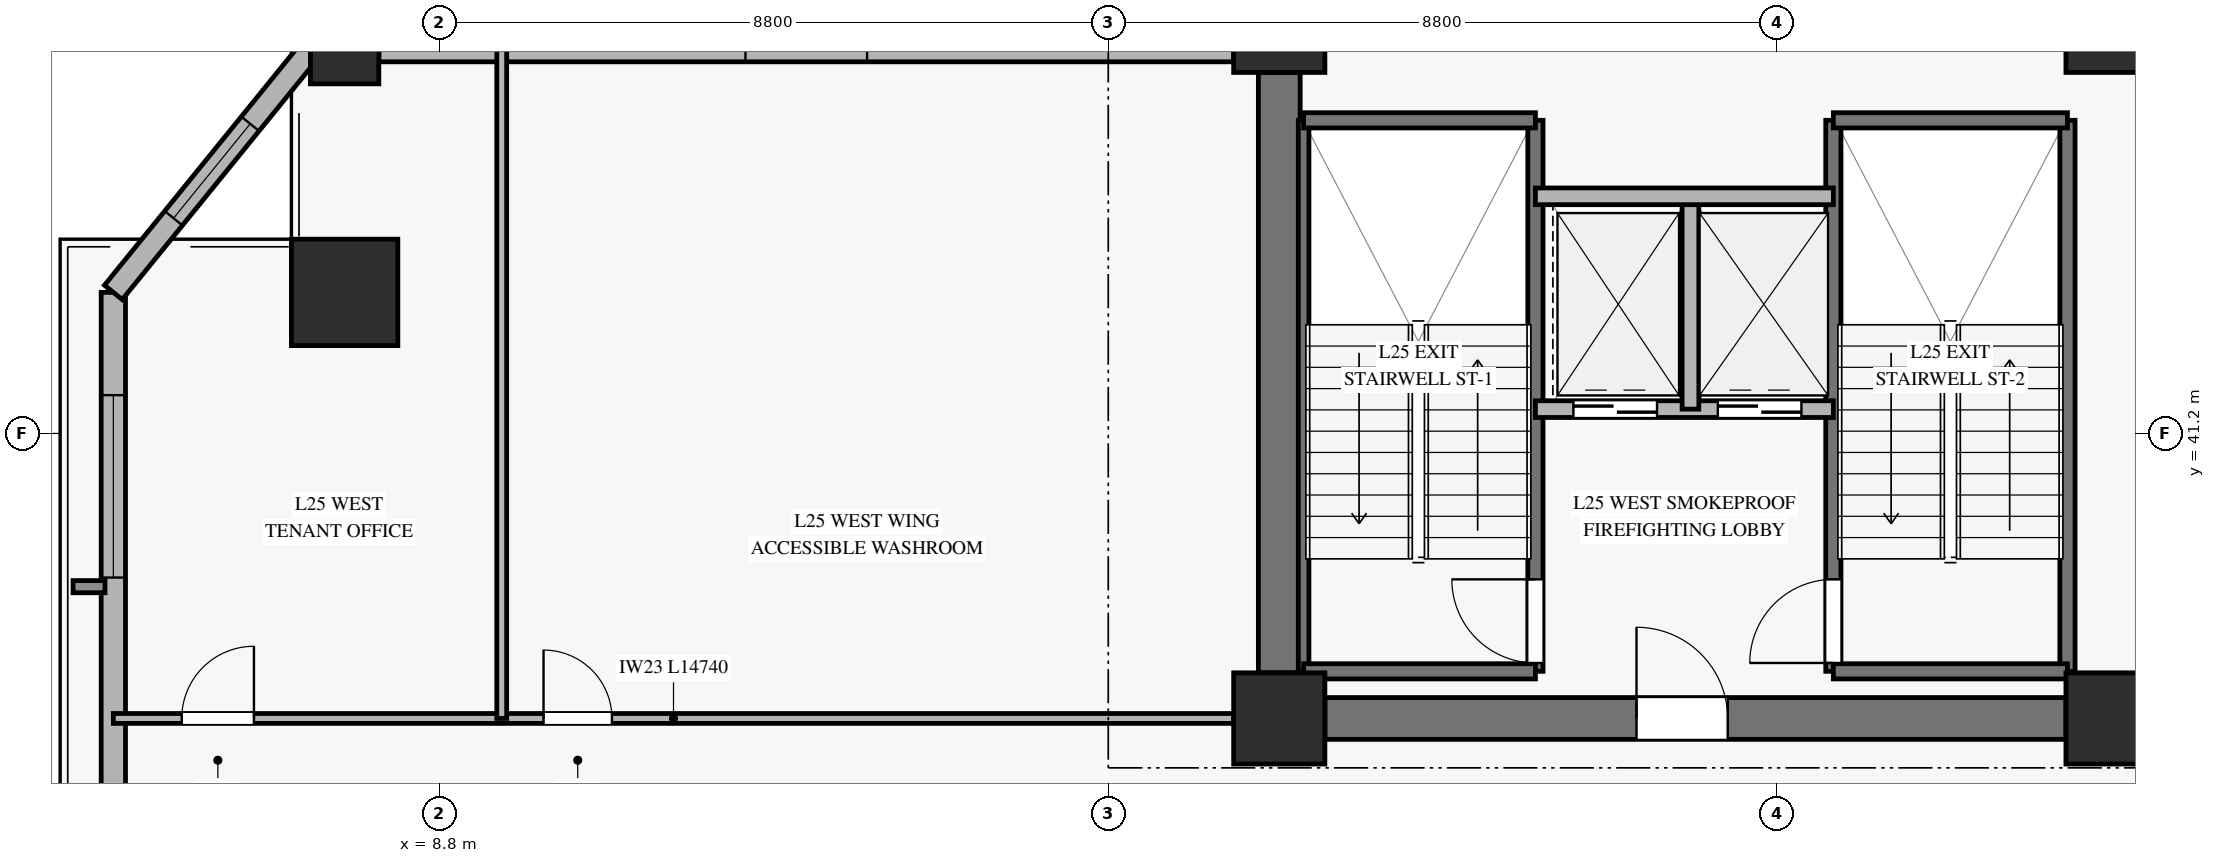
"""IFC4 building model, lengths in metres.
Left out: names, types, materials, properties, quantities, classifications, styles, units other than length and angle.
Written with IfcOpenShell. Run it as: python <this file> out.ifc"""

import sys

from ifc_helpers import new_model, si_unit, direction, frame, frame_2d, origin, origin_2d, place, context, subcontext, project, spatial, rectangle, hollow_rectangle, extrude, source, transform, mapped, element, fill, save


model = new_model("IFC4")
c1 = context("Model", 3, precision=1e-05, world=origin(), true_north=direction((0.0, 1.0)))
c2 = subcontext(c1, "Body", "Model", "MODEL_VIEW")
j1 = project(units=[si_unit("LENGTHUNIT", "METRE"), si_unit("PLANEANGLEUNIT", "RADIAN")], contexts=[c1])
p1 = place(None, origin())
s1 = spatial("IfcSite", under=j1, at=p1, CompositionType="ELEMENT")
p2 = place(p1, origin())
s2 = spatial("IfcBuilding", under=s1, at=p2, CompositionType="ELEMENT")
p3 = place(p2, frame((0.0, 0.0, 103.6)))
s3 = spatial("IfcBuildingStorey", under=s2, at=p3, CompositionType="ELEMENT", Elevation=103.6)
m1 = source(origin(), c2, "Body", "SweptSolid", [
    extrude(rectangle(XDim=1.2, YDim=1.2, at=origin_2d()), origin(), (0.0, 0.0, 1.0), 3.68),
])
for number, where, z_axis, x_axis in (
    (1, (19.85, 37.45, 0.0), (0.0, 0.0, 1.0), (1.0, 0.0, 0.0)),
    (2, (19.85, 46.55, 0.0), (0.0, 0.0, 1.0), (1.0, 0.0, 0.0)),
    (3, (30.8, 37.45, 0.0), (0.0, 0.0, 1.0), (1.0, 0.0, 0.0)),
    (4, (30.8, 46.55, 0.0), (0.0, 0.0, 1.0), (1.0, 0.0, 0.0)),
):
    element("IfcColumn", number, at=place(p3, frame(where, z_axis=z_axis, x_axis=x_axis)), inside=s3, PredefinedType="PILASTER", context=c2, shape_type="MappedRepresentation", body=[
        mapped(m1, transform((0.0, 0.0, 0.0), x_axis=(1.0, 0.0, 0.0), y_axis=(0.0, 1.0, 0.0), z_axis=(0.0, 0.0, 1.0), scale=1.0)),
    ])
p4 = place(p3, frame((20.45, 37.45, 0.0), z_axis=(0.0, 0.0, 1.0), x_axis=(1.0, 0.0, 0.0)))
e5 = element("IfcWall", 5, at=p4, inside=s3, PredefinedType="SHEAR", context=c2, shape_type="SweptSolid", body=[
    extrude(rectangle(XDim=9.75, YDim=0.55, at=frame_2d((4.875, 0.0))), origin(), (0.0, 0.0, 1.0), 3.68),
])
p5 = place(p4, frame((4.1, 0.0, 0.0)))
e6 = element("IfcOpeningElement", 6, at=p5, cuts=e5, PredefinedType="OPENING", context=c2, shape_type="SweptSolid", body=[
    extrude(rectangle(XDim=1.2, YDim=2.15, at=frame_2d((0.6, 1.075))), frame((0.0, 0.285, 0.0), z_axis=(0.0, -1.0, 0.0), x_axis=(1.0, 0.0, 0.0)), (0.0, 0.0, 1.0), 0.57),
])
p6 = place(p3, frame((19.85, 38.05, 0.0), z_axis=(0.0, 0.0, 1.0), x_axis=(0.0, 1.0, 0.0)))
e7 = element("IfcWall", 7, at=p6, inside=s3, PredefinedType="SHEAR", context=c2, shape_type="SweptSolid", body=[
    extrude(rectangle(XDim=7.9, YDim=0.55, at=frame_2d((3.95, 0.0))), origin(), (0.0, 0.0, 1.0), 3.68),
])
m2 = source(origin(), c2, "Body", "SweptSolid", [
    extrude(hollow_rectangle(XDim=1.4, YDim=1.4, WallThickness=0.065, at=origin_2d()), origin(), (0.0, 0.0, 1.0), 3.68),
])
p7 = place(p3, frame((7.553, 43.056, 0.0), z_axis=(0.0, 0.0, 1.0), x_axis=(1.0, 0.0, 0.0)))
e8 = element("IfcColumn", 8, at=p7, inside=s3, PredefinedType="COLUMN", context=c2, shape_type="MappedRepresentation", body=[
    mapped(m2, transform((0.0, 0.0, 0.0), x_axis=(1.0, 0.0, 0.0), y_axis=(0.0, 1.0, 0.0), z_axis=(0.0, 0.0, 1.0), scale=1.0)),
])
m3 = source(origin(), c2, "Body", "SweptSolid", [
    extrude(hollow_rectangle(XDim=0.9, YDim=0.9, WallThickness=0.04, at=origin_2d()), origin(), (0.0, 0.0, 1.0), 3.68),
])
p8 = place(p3, frame((7.553, 46.25, 0.0), z_axis=(0.0, 0.0, 1.0), x_axis=(1.0, 0.0, 0.0)))
e9 = element("IfcColumn", 9, at=p8, inside=s3, PredefinedType="COLUMN", context=c2, shape_type="MappedRepresentation", body=[
    mapped(m3, transform((0.0, 0.0, 0.0), x_axis=(1.0, 0.0, 0.0), y_axis=(0.0, 1.0, 0.0), z_axis=(0.0, 0.0, 1.0), scale=1.0)),
])
p9 = place(p3, frame((4.51, 26.73, 0.0), z_axis=(0.0, 0.0, 1.0), x_axis=(0.0, 1.0, 0.0)))
e10 = element("IfcWall", 10, at=p9, inside=s3, PredefinedType="SOLIDWALL", context=c2, shape_type="SweptSolid", body=[
    extrude(rectangle(XDim=16.326, YDim=0.32, at=frame_2d((8.163, 0.0))), origin(), (0.0, 0.0, 1.0), 3.16),
])
p10 = place(p9, frame((1.26, 0.0, 0.45)))
e11 = element("IfcOpeningElement", 11, at=p10, cuts=e10, PredefinedType="OPENING", context=c2, shape_type="SweptSolid", body=[
    extrude(rectangle(XDim=2.4, YDim=2.1, at=frame_2d((1.2, 1.05))), frame((0.0, 0.17, 0.0), z_axis=(0.0, -1.0, 0.0), x_axis=(1.0, 0.0, 0.0)), (0.0, 0.0, 1.0), 0.34),
])
p11 = place(p9, frame((12.574, 0.0, 0.45)))
e12 = element("IfcOpeningElement", 12, at=p11, cuts=e10, PredefinedType="OPENING", context=c2, shape_type="SweptSolid", body=[
    extrude(rectangle(XDim=2.4, YDim=2.1, at=frame_2d((1.2, 1.05))), frame((0.0, 0.17, 0.0), z_axis=(0.0, -1.0, 0.0), x_axis=(1.0, 0.0, 0.0)), (0.0, 0.0, 1.0), 0.34),
])
p12 = place(p3, frame((8.003, 46.25, 0.0), z_axis=(0.0, 0.0, 1.0), x_axis=(1.0, 0.0, 0.0)))
e13 = element("IfcWall", 13, at=p12, inside=s3, PredefinedType="SOLIDWALL", context=c2, shape_type="SweptSolid", body=[
    extrude(rectangle(XDim=11.247, YDim=0.32, at=frame_2d((5.624, 0.0))), origin(), (0.0, 0.0, 1.0), 3.16),
])
p13 = place(p12, frame((4.824, 0.0, 0.45)))
e14 = element("IfcOpeningElement", 14, at=p13, cuts=e13, PredefinedType="OPENING", context=c2, shape_type="SweptSolid", body=[
    extrude(rectangle(XDim=1.6, YDim=2.0, at=frame_2d((0.8, 1.0))), frame((0.0, 0.17, 0.0), z_axis=(0.0, -1.0, 0.0), x_axis=(1.0, 0.0, 0.0)), (0.0, 0.0, 1.0), 0.34),
])
p14 = place(p3, frame((7.103, 46.25, 0.0), z_axis=(0.0, 0.0, 1.0), x_axis=(-0.630273101398, -0.776373503962, 0.0)))
e15 = element("IfcWall", 15, at=p14, inside=s3, PredefinedType="SOLIDWALL", context=c2, shape_type="SweptSolid", body=[
    extrude(rectangle(XDim=4.114, YDim=0.3, at=frame_2d((2.057, 0.0))), origin(), (0.0, 0.0, 1.0), 3.16),
])
p15 = place(p14, frame((1.257, 0.0, 0.45)))
e16 = element("IfcOpeningElement", 16, at=p15, cuts=e15, PredefinedType="OPENING", context=c2, shape_type="SweptSolid", body=[
    extrude(rectangle(XDim=1.6, YDim=2.0, at=frame_2d((0.8, 1.0))), frame((0.0, 0.16, 0.0), z_axis=(0.0, -1.0, 0.0), x_axis=(1.0, 0.0, 0.0)), (0.0, 0.0, 1.0), 0.32),
])
p16 = place(p3, frame((20.17, 38.07, 0.0), z_axis=(0.0, 0.0, 1.0), x_axis=(0.0, 1.0, 0.0)))
e17 = element("IfcWall", 17, at=p16, inside=s3, PredefinedType="SOLIDWALL", context=c2, shape_type="SweptSolid", body=[
    extrude(rectangle(XDim=7.25, YDim=0.14, at=frame_2d((3.625, 0.0))), origin(), (0.0, 0.0, 1.0), 3.9),
])
p17 = place(p3, frame((23.22, 38.07, 0.0), z_axis=(0.0, 0.0, 1.0), x_axis=(0.0, 1.0, 0.0)))
e18 = element("IfcWall", 18, at=p17, inside=s3, PredefinedType="SOLIDWALL", context=c2, shape_type="SweptSolid", body=[
    extrude(rectangle(XDim=7.25, YDim=0.2, at=frame_2d((3.625, 0.0))), origin(), (0.0, 0.0, 1.0), 3.9),
])
p18 = place(p17, frame((0.11, 0.0, 0.0)))
e19 = element("IfcOpeningElement", 19, at=p18, cuts=e18, PredefinedType="OPENING", context=c2, shape_type="SweptSolid", body=[
    extrude(rectangle(XDim=1.1, YDim=2.15, at=frame_2d((0.55, 1.075))), frame((0.0, 0.11, 0.0), z_axis=(0.0, -1.0, 0.0), x_axis=(1.0, 0.0, 0.0)), (0.0, 0.0, 1.0), 0.22),
])
for number, where, z_axis, x_axis in (
    (20, (20.17, 45.32, 0.0), (0.0, 0.0, 1.0), (1.0, 0.0, 0.0)),
    (21, (20.17, 38.07, 0.0), (0.0, 0.0, 1.0), (1.0, 0.0, 0.0)),
):
    element("IfcWall", number, at=place(p3, frame(where, z_axis=z_axis, x_axis=x_axis)), inside=s3, PredefinedType="SOLIDWALL", context=c2, shape_type="SweptSolid", body=[
        extrude(rectangle(XDim=3.05, YDim=0.2, at=frame_2d((1.525, 0.0))), origin(), (0.0, 0.0, 1.0), 3.9),
    ])
p19 = place(p3, frame((27.14, 38.07, 0.0), z_axis=(0.0, 0.0, 1.0), x_axis=(0.0, 1.0, 0.0)))
e22 = element("IfcWall", 22, at=p19, inside=s3, PredefinedType="SOLIDWALL", context=c2, shape_type="SweptSolid", body=[
    extrude(rectangle(XDim=7.25, YDim=0.2, at=frame_2d((3.625, 0.0))), origin(), (0.0, 0.0, 1.0), 3.9),
])
p20 = place(p19, frame((0.11, 0.0, 0.0)))
e23 = element("IfcOpeningElement", 23, at=p20, cuts=e22, PredefinedType="OPENING", context=c2, shape_type="SweptSolid", body=[
    extrude(rectangle(XDim=1.1, YDim=2.15, at=frame_2d((0.55, 1.075))), frame((0.0, 0.11, 0.0), z_axis=(0.0, -1.0, 0.0), x_axis=(1.0, 0.0, 0.0)), (0.0, 0.0, 1.0), 0.22),
])
p21 = place(p3, frame((30.22, 38.07, 0.0), z_axis=(0.0, 0.0, 1.0), x_axis=(0.0, 1.0, 0.0)))
e24 = element("IfcWall", 24, at=p21, inside=s3, PredefinedType="SOLIDWALL", context=c2, shape_type="SweptSolid", body=[
    extrude(rectangle(XDim=7.25, YDim=0.2, at=frame_2d((3.625, 0.0))), origin(), (0.0, 0.0, 1.0), 3.9),
])
for number, where, z_axis, x_axis in (
    (25, (27.14, 45.32, 0.0), (0.0, 0.0, 1.0), (1.0, 0.0, 0.0)),
    (26, (27.14, 38.07, 0.0), (0.0, 0.0, 1.0), (1.0, 0.0, 0.0)),
):
    element("IfcWall", number, at=place(p3, frame(where, z_axis=z_axis, x_axis=x_axis)), inside=s3, PredefinedType="SOLIDWALL", context=c2, shape_type="SweptSolid", body=[
        extrude(rectangle(XDim=3.08, YDim=0.2, at=frame_2d((1.54, 0.0))), origin(), (0.0, 0.0, 1.0), 3.9),
    ])
p22 = place(p3, frame((23.22, 41.52, 0.0), z_axis=(0.0, 0.0, 1.0), x_axis=(1.0, 0.0, 0.0)))
e27 = element("IfcWall", 27, at=p22, inside=s3, PredefinedType="SOLIDWALL", context=c2, shape_type="SweptSolid", body=[
    extrude(rectangle(XDim=3.92, YDim=0.22, at=frame_2d((1.96, 0.0))), origin(), (0.0, 0.0, 1.0), 3.68),
])
p23 = place(p22, frame((0.5, 0.0, 0.0)))
e28 = element("IfcOpeningElement", 28, at=p23, cuts=e27, PredefinedType="OPENING", context=c2, shape_type="SweptSolid", body=[
    extrude(rectangle(XDim=1.1, YDim=2.2, at=frame_2d((0.55, 1.1))), frame((0.0, 0.12, 0.0), z_axis=(0.0, -1.0, 0.0), x_axis=(1.0, 0.0, 0.0)), (0.0, 0.0, 1.0), 0.24),
])
p24 = place(p22, frame((2.4, 0.0, 0.0)))
e29 = element("IfcOpeningElement", 29, at=p24, cuts=e27, PredefinedType="OPENING", context=c2, shape_type="SweptSolid", body=[
    extrude(rectangle(XDim=1.1, YDim=2.2, at=frame_2d((0.55, 1.1))), frame((0.0, 0.12, 0.0), z_axis=(0.0, -1.0, 0.0), x_axis=(1.0, 0.0, 0.0)), (0.0, 0.0, 1.0), 0.24),
])
p25 = place(p3, frame((25.26, 41.52, 0.0), z_axis=(0.0, 0.0, 1.0), x_axis=(0.0, 1.0, 0.0)))
e30 = element("IfcWall", 30, at=p25, inside=s3, PredefinedType="SOLIDWALL", context=c2, shape_type="SweptSolid", body=[
    extrude(rectangle(XDim=2.8, YDim=0.22, at=frame_2d((1.4, 0.0))), origin(), (0.0, 0.0, 1.0), 3.68),
])
p26 = place(p3, frame((23.22, 44.32, 0.0), z_axis=(0.0, 0.0, 1.0), x_axis=(1.0, 0.0, 0.0)))
e31 = element("IfcWall", 31, at=p26, inside=s3, PredefinedType="SOLIDWALL", context=c2, shape_type="SweptSolid", body=[
    extrude(rectangle(XDim=3.92, YDim=0.22, at=frame_2d((1.96, 0.0))), origin(), (0.0, 0.0, 1.0), 3.68),
])
p27 = place(p3, frame((4.51, 37.45, 0.0), z_axis=(0.0, 0.0, 1.0), x_axis=(1.0, 0.0, 0.0)))
e32 = element("IfcWall", 32, at=p27, inside=s3, PredefinedType="PARTITIONING", context=c2, shape_type="SweptSolid", body=[
    extrude(rectangle(XDim=14.74, YDim=0.13, at=frame_2d((7.37, 0.0))), origin(), (0.0, 0.0, 1.0), 3.165),
])
p28 = place(p27, frame((0.9, 0.0, 0.0)))
e33 = element("IfcOpeningElement", 33, at=p28, cuts=e32, PredefinedType="OPENING", context=c2, shape_type="SweptSolid", body=[
    extrude(rectangle(XDim=0.95, YDim=2.1, at=frame_2d((0.475, 1.05))), frame((0.0, 0.075, 0.0), z_axis=(0.0, -1.0, 0.0), x_axis=(1.0, 0.0, 0.0)), (0.0, 0.0, 1.0), 0.15),
])
p29 = place(p27, frame((5.66, 0.0, 0.0)))
e34 = element("IfcOpeningElement", 34, at=p29, cuts=e32, PredefinedType="OPENING", context=c2, shape_type="SweptSolid", body=[
    extrude(rectangle(XDim=0.9, YDim=2.1, at=frame_2d((0.45, 1.05))), frame((0.0, 0.075, 0.0), z_axis=(0.0, -1.0, 0.0), x_axis=(1.0, 0.0, 0.0)), (0.0, 0.0, 1.0), 0.15),
])
p30 = place(p3, frame((9.62, 37.45, 0.0), z_axis=(0.0, 0.0, 1.0), x_axis=(0.0, 1.0, 0.0)))
e35 = element("IfcWall", 35, at=p30, inside=s3, PredefinedType="PARTITIONING", context=c2, shape_type="SweptSolid", body=[
    extrude(rectangle(XDim=8.8, YDim=0.13, at=frame_2d((4.4, 0.0))), origin(), (0.0, 0.0, 1.0), 3.68),
])
m4 = source(origin(), c2, "Body", "SweptSolid", [
    extrude(rectangle(XDim=2.4, YDim=2.1, at=frame_2d((1.2, 1.05))), frame((0.0, 0.03, 0.0), z_axis=(0.0, -1.0, 0.0), x_axis=(1.0, 0.0, 0.0)), (0.0, 0.0, 1.0), 0.06),
])
p31 = place(p11, origin())
e36 = element("IfcWindow", 36, at=p31, inside=s3, PartitioningType="SINGLE_PANEL", PredefinedType="WINDOW", context=c2, shape_type="MappedRepresentation", body=[
    mapped(m4, transform((0.0, 0.0, 0.0), x_axis=(1.0, 0.0, 0.0), y_axis=(0.0, 1.0, 0.0), z_axis=(0.0, 0.0, 1.0), scale=1.0)),
])
fill(e12, e36)
m5 = source(origin(), c2, "Body", "SweptSolid", [
    extrude(rectangle(XDim=1.6, YDim=2.0, at=frame_2d((0.8, 1.0))), frame((0.0, 0.03, 0.0), z_axis=(0.0, -1.0, 0.0), x_axis=(1.0, 0.0, 0.0)), (0.0, 0.0, 1.0), 0.06),
])
p32 = place(p15, origin())
e37 = element("IfcWindow", 37, at=p32, inside=s3, PartitioningType="SINGLE_PANEL", PredefinedType="WINDOW", context=c2, shape_type="MappedRepresentation", body=[
    mapped(m5, transform((0.0, 0.0, 0.0), x_axis=(1.0, 0.0, 0.0), y_axis=(0.0, 1.0, 0.0), z_axis=(0.0, 0.0, 1.0), scale=1.0)),
])
fill(e16, e37)
m6 = source(origin(), c2, "Body", "SweptSolid", [
    extrude(rectangle(XDim=1.1, YDim=2.15, at=frame_2d((0.55, 1.075))), frame((0.0, 0.025, 0.0), z_axis=(0.0, -1.0, 0.0), x_axis=(1.0, 0.0, 0.0)), (0.0, 0.0, 1.0), 0.05),
])
p33 = place(p18, origin())
e38 = element("IfcDoor", 38, at=p33, inside=s3, OperationType="SINGLE_SWING_RIGHT", PredefinedType="DOOR", context=c2, shape_type="MappedRepresentation", body=[
    mapped(m6, transform((0.0, 0.0, 0.0), x_axis=(1.0, 0.0, 0.0), y_axis=(0.0, 1.0, 0.0), z_axis=(0.0, 0.0, 1.0), scale=1.0)),
])
fill(e19, e38)
p34 = place(p20, origin())
e39 = element("IfcDoor", 39, at=p34, inside=s3, OperationType="SINGLE_SWING_LEFT", PredefinedType="DOOR", context=c2, shape_type="MappedRepresentation", body=[
    mapped(m6, transform((0.0, 0.0, 0.0), x_axis=(1.0, 0.0, 0.0), y_axis=(0.0, 1.0, 0.0), z_axis=(0.0, 0.0, 1.0), scale=1.0)),
])
fill(e23, e39)
m7 = source(origin(), c2, "Body", "SweptSolid", [
    extrude(rectangle(XDim=1.1, YDim=2.2, at=frame_2d((0.55, 1.1))), frame((0.0, 0.025, 0.0), z_axis=(0.0, -1.0, 0.0), x_axis=(1.0, 0.0, 0.0)), (0.0, 0.0, 1.0), 0.05),
])
p35 = place(p23, origin())
e40 = element("IfcDoor", 40, at=p35, inside=s3, OperationType="SLIDING_TO_LEFT", PredefinedType="DOOR", context=c2, shape_type="MappedRepresentation", body=[
    mapped(m7, transform((0.0, 0.0, 0.0), x_axis=(1.0, 0.0, 0.0), y_axis=(0.0, 1.0, 0.0), z_axis=(0.0, 0.0, 1.0), scale=1.0)),
])
fill(e28, e40)
p36 = place(p24, origin())
e41 = element("IfcDoor", 41, at=p36, inside=s3, OperationType="SLIDING_TO_LEFT", PredefinedType="DOOR", context=c2, shape_type="MappedRepresentation", body=[
    mapped(m7, transform((0.0, 0.0, 0.0), x_axis=(1.0, 0.0, 0.0), y_axis=(0.0, 1.0, 0.0), z_axis=(0.0, 0.0, 1.0), scale=1.0)),
])
fill(e29, e41)
m8 = source(origin(), c2, "Body", "SweptSolid", [
    extrude(rectangle(XDim=1.2, YDim=2.15, at=frame_2d((0.6, 1.075))), frame((0.0, 0.025, 0.0), z_axis=(0.0, -1.0, 0.0), x_axis=(1.0, 0.0, 0.0)), (0.0, 0.0, 1.0), 0.05),
])
p37 = place(p5, origin())
e42 = element("IfcDoor", 42, at=p37, inside=s3, OperationType="SINGLE_SWING_LEFT", PredefinedType="DOOR", context=c2, shape_type="MappedRepresentation", body=[
    mapped(m8, transform((0.0, 0.0, 0.0), x_axis=(1.0, 0.0, 0.0), y_axis=(0.0, 1.0, 0.0), z_axis=(0.0, 0.0, 1.0), scale=1.0)),
])
fill(e6, e42)
m9 = source(origin(), c2, "Body", "SweptSolid", [
    extrude(rectangle(XDim=0.95, YDim=2.1, at=frame_2d((0.475, 1.05))), frame((0.0, 0.025, 0.0), z_axis=(0.0, -1.0, 0.0), x_axis=(1.0, 0.0, 0.0)), (0.0, 0.0, 1.0), 0.05),
])
p38 = place(p28, origin())
e43 = element("IfcDoor", 43, at=p38, inside=s3, OperationType="SINGLE_SWING_RIGHT", PredefinedType="DOOR", context=c2, shape_type="MappedRepresentation", body=[
    mapped(m9, transform((0.0, 0.0, 0.0), x_axis=(1.0, 0.0, 0.0), y_axis=(0.0, 1.0, 0.0), z_axis=(0.0, 0.0, 1.0), scale=1.0)),
])
fill(e33, e43)
m10 = source(origin(), c2, "Body", "SweptSolid", [
    extrude(rectangle(XDim=0.9, YDim=2.1, at=frame_2d((0.45, 1.05))), frame((0.0, 0.025, 0.0), z_axis=(0.0, -1.0, 0.0), x_axis=(1.0, 0.0, 0.0)), (0.0, 0.0, 1.0), 0.05),
])
p39 = place(p29, origin())
e44 = element("IfcDoor", 44, at=p39, inside=s3, OperationType="SINGLE_SWING_LEFT", PredefinedType="DOOR", context=c2, shape_type="MappedRepresentation", body=[
    mapped(m10, transform((0.0, 0.0, 0.0), x_axis=(1.0, 0.0, 0.0), y_axis=(0.0, 1.0, 0.0), z_axis=(0.0, 0.0, 1.0), scale=1.0)),
])
fill(e34, e44)
save(model, sys.argv[1])
